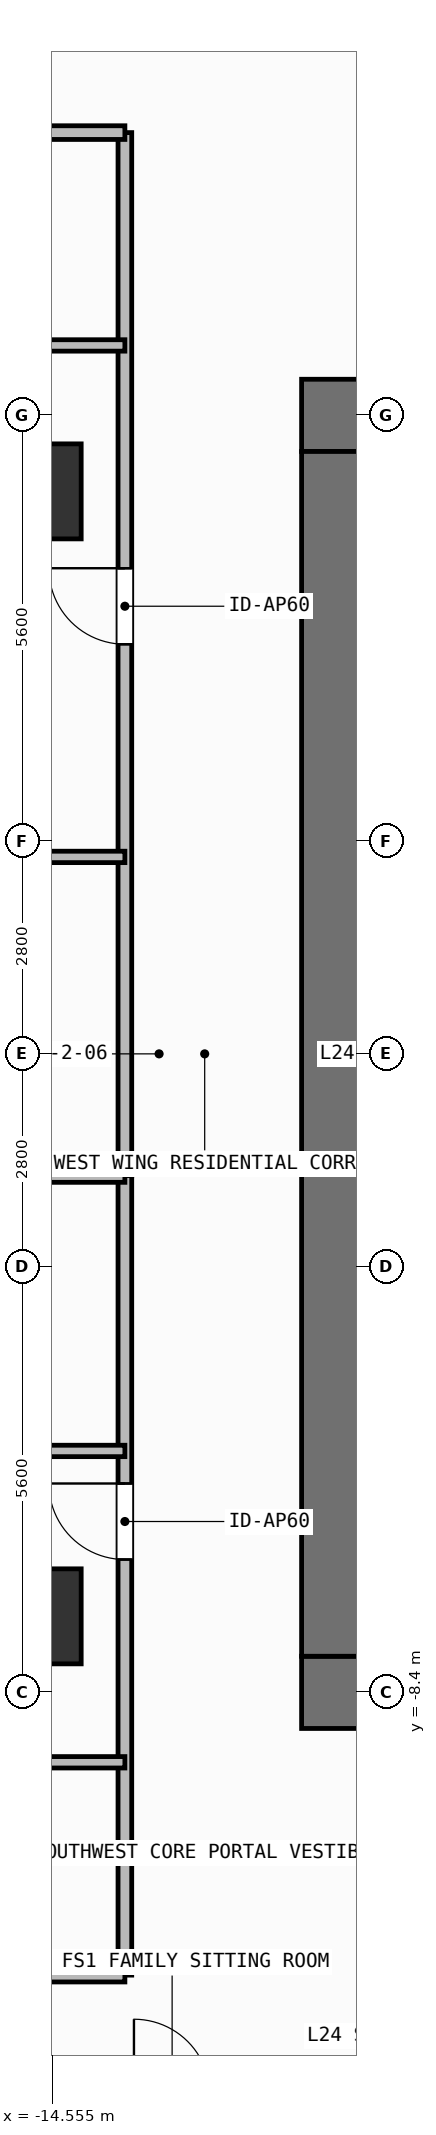
"""IFC4 building model, lengths in metres.
Left out: names, types, materials, properties, quantities, classifications, styles, units other than length and angle.
Written with IfcOpenShell. Run it as: python <this file> out.ifc"""

import sys

from ifc_helpers import new_model, si_unit, direction, frame, frame_2d, origin, origin_2d, place, context, subcontext, project, spatial, rectangle, extrude, element, fill, save


model = new_model("IFC4")
c1 = context("Model", 3, precision=1e-05, world=origin(), true_north=direction((0.0, 1.0)))
c2 = subcontext(c1, "Body", "Model", "MODEL_VIEW")
j1 = project(units=[si_unit("LENGTHUNIT", "METRE"), si_unit("PLANEANGLEUNIT", "RADIAN")], contexts=[c1])
p1 = place(None, origin())
s1 = spatial("IfcSite", under=j1, at=p1, CompositionType="ELEMENT")
p2 = place(p1, origin())
s2 = spatial("IfcBuilding", under=s1, at=p2, CompositionType="ELEMENT")
p3 = place(p2, frame((0.0, 0.0, 96.9)))
s3 = spatial("IfcBuildingStorey", under=s2, at=p3, CompositionType="ELEMENT", Elevation=96.9)
for number, where, z_axis, x_axis in (
    (1, (-11.275, -8.4, 0.0), (0.0, 0.0, 1.0), (1.0, 0.0, 0.0)),
    (2, (-11.275, 8.4, 0.0), (0.0, 0.0, 1.0), (1.0, 0.0, 0.0)),
):
    element("IfcWall", number, at=place(p3, frame(where, z_axis=z_axis, x_axis=x_axis)), inside=s3, PredefinedType="SHEAR", context=c2, shape_type="SweptSolid", body=[
        extrude(rectangle(XDim=1.575, YDim=0.95, at=frame_2d((0.788, 0.0))), origin(), (0.0, 0.0, 1.0), 3.9),
    ])
p4 = place(p3, frame((-10.8, -7.925, 0.0), z_axis=(0.0, 0.0, 1.0), x_axis=(0.0, 1.0, 0.0)))
e3 = element("IfcWall", 3, at=p4, inside=s3, PredefinedType="SHEAR", context=c2, shape_type="SweptSolid", body=[
    extrude(rectangle(XDim=15.85, YDim=0.95, at=frame_2d((7.925, 0.0))), origin(), (0.0, 0.0, 1.0), 3.9),
])
for number, where, z_axis, x_axis in (
    (4, (-14.8, -7.4, 0.0), (0.0, 0.0, 1.0), (1.0, 0.0, 0.0)),
    (5, (-14.8, 7.4, 0.0), (0.0, 0.0, 1.0), (1.0, 0.0, 0.0)),
):
    element("IfcColumn", number, at=place(p3, frame(where, z_axis=z_axis, x_axis=x_axis)), inside=s3, PredefinedType="COLUMN", context=c2, shape_type="SweptSolid", body=[
        extrude(rectangle(XDim=1.25, YDim=1.25, at=origin_2d()), origin(), (0.0, 0.0, 1.0), 3.9),
    ])
p5 = place(p3, frame((-13.6, -12.12, 0.0), z_axis=(0.0, 0.0, 1.0), x_axis=(0.0, 1.0, 0.0)))
e6 = element("IfcWall", 6, at=p5, inside=s3, PredefinedType="PARTITIONING", context=c2, shape_type="SweptSolid", body=[
    extrude(rectangle(XDim=10.52, YDim=0.18, at=frame_2d((5.26, 0.0))), origin(), (0.0, 0.0, 1.0), 3.68),
])
p6 = place(p5, frame((5.468, 0.0, 0.0)))
e7 = element("IfcOpeningElement", 7, at=p6, cuts=e6, PredefinedType="OPENING", context=c2, shape_type="SweptSolid", body=[
    extrude(rectangle(XDim=1.0, YDim=2.2, at=frame_2d((0.5, 1.1))), frame((0.0, 0.1, 0.0), z_axis=(0.0, -1.0, 0.0), x_axis=(1.0, 0.0, 0.0)), (0.0, 0.0, 1.0), 0.2),
])
p7 = place(p3, frame((-19.553, -5.224, 0.0), z_axis=(0.0, 0.0, 1.0), x_axis=(1.0, 0.0, 0.0)))
e8 = element("IfcWall", 8, at=p7, inside=s3, PredefinedType="PARTITIONING", context=c2, shape_type="SweptSolid", body=[
    extrude(rectangle(XDim=5.953, YDim=0.15, at=frame_2d((2.977, 0.0))), origin(), (0.0, 0.0, 1.0), 3.68),
])
p8 = place(p7, frame((2.64, 0.0, 0.0)))
e9 = element("IfcOpeningElement", 9, at=p8, cuts=e8, PredefinedType="OPENING", context=c2, shape_type="SweptSolid", body=[
    extrude(rectangle(XDim=0.85, YDim=2.1, at=frame_2d((0.425, 1.05))), frame((0.0, 0.085, 0.0), z_axis=(0.0, -1.0, 0.0), x_axis=(1.0, 0.0, 0.0)), (0.0, 0.0, 1.0), 0.17),
])
p9 = place(p3, frame((-23.69, -9.32, 0.0), z_axis=(0.0, 0.0, 1.0), x_axis=(1.0, 0.0, 0.0)))
e10 = element("IfcWall", 10, at=p9, inside=s3, PredefinedType="PARTITIONING", context=c2, shape_type="SweptSolid", body=[
    extrude(rectangle(XDim=10.09, YDim=0.15, at=frame_2d((5.045, 0.0))), origin(), (0.0, 0.0, 1.0), 3.68),
])
p10 = place(p9, frame((5.512, 0.0, 0.0)))
e11 = element("IfcOpeningElement", 11, at=p10, cuts=e10, PredefinedType="OPENING", context=c2, shape_type="SweptSolid", body=[
    extrude(rectangle(XDim=0.85, YDim=2.1, at=frame_2d((0.425, 1.05))), frame((0.0, 0.085, 0.0), z_axis=(0.0, -1.0, 0.0), x_axis=(1.0, 0.0, 0.0)), (0.0, 0.0, 1.0), 0.17),
])
p11 = place(p3, frame((-13.6, -1.6, 0.0), z_axis=(0.0, 0.0, 1.0), x_axis=(0.0, 1.0, 0.0)))
e12 = element("IfcWall", 12, at=p11, inside=s3, PredefinedType="PARTITIONING", context=c2, shape_type="SweptSolid", body=[
    extrude(rectangle(XDim=13.72, YDim=0.18, at=frame_2d((6.86, 0.0))), origin(), (0.0, 0.0, 1.0), 3.68),
])
p12 = place(p11, frame((6.989, 0.0, 0.0)))
e13 = element("IfcOpeningElement", 13, at=p12, cuts=e12, PredefinedType="OPENING", context=c2, shape_type="SweptSolid", body=[
    extrude(rectangle(XDim=1.0, YDim=2.2, at=frame_2d((0.5, 1.1))), frame((0.0, 0.1, 0.0), z_axis=(0.0, -1.0, 0.0), x_axis=(1.0, 0.0, 0.0)), (0.0, 0.0, 1.0), 0.2),
])
p13 = place(p3, frame((-19.553, 9.32, 0.0), z_axis=(0.0, 0.0, 1.0), x_axis=(1.0, 0.0, 0.0)))
e14 = element("IfcWall", 14, at=p13, inside=s3, PredefinedType="PARTITIONING", context=c2, shape_type="SweptSolid", body=[
    extrude(rectangle(XDim=5.953, YDim=0.15, at=frame_2d((2.977, 0.0))), origin(), (0.0, 0.0, 1.0), 3.68),
])
p14 = place(p13, frame((2.64, 0.0, 0.0)))
e15 = element("IfcOpeningElement", 15, at=p14, cuts=e14, PredefinedType="OPENING", context=c2, shape_type="SweptSolid", body=[
    extrude(rectangle(XDim=0.85, YDim=2.1, at=frame_2d((0.425, 1.05))), frame((0.0, 0.085, 0.0), z_axis=(0.0, -1.0, 0.0), x_axis=(1.0, 0.0, 0.0)), (0.0, 0.0, 1.0), 0.17),
])
p15 = place(p3, frame((-23.69, 2.591, 0.0), z_axis=(0.0, 0.0, 1.0), x_axis=(1.0, 0.0, 0.0)))
e16 = element("IfcWall", 16, at=p15, inside=s3, PredefinedType="PARTITIONING", context=c2, shape_type="SweptSolid", body=[
    extrude(rectangle(XDim=10.09, YDim=0.15, at=frame_2d((5.045, 0.0))), origin(), (0.0, 0.0, 1.0), 3.68),
])
p16 = place(p15, frame((4.62, 0.0, 0.0)))
e17 = element("IfcOpeningElement", 17, at=p16, cuts=e16, PredefinedType="OPENING", context=c2, shape_type="SweptSolid", body=[
    extrude(rectangle(XDim=0.85, YDim=2.1, at=frame_2d((0.425, 1.05))), frame((0.0, 0.085, 0.0), z_axis=(0.0, -1.0, 0.0), x_axis=(1.0, 0.0, 0.0)), (0.0, 0.0, 1.0), 0.17),
])
for number, where, z_axis, x_axis in (
    (18, (-27.93, -1.6, 0.0), (0.0, 0.0, 1.0), (1.0, 0.0, 0.0)),
    (19, (-27.93, -12.12, 0.0), (0.0, 0.0, 1.0), (1.0, 0.0, 0.0)),
    (20, (-27.93, 12.12, 0.0), (0.0, 0.0, 1.0), (1.0, 0.0, 0.0)),
):
    element("IfcWall", number, at=place(p3, frame(where, z_axis=z_axis, x_axis=x_axis)), inside=s3, PredefinedType="PARTITIONING", context=c2, shape_type="SweptSolid", body=[
        extrude(rectangle(XDim=14.33, YDim=0.18, at=frame_2d((7.165, 0.0))), origin(), (0.0, 0.0, 1.0), 3.68),
    ])
p17 = place(p6, origin())
e21 = element("IfcDoor", 21, at=p17, inside=s3, OperationType="SINGLE_SWING_RIGHT", PredefinedType="DOOR", context=c2, shape_type="SweptSolid", body=[
    extrude(rectangle(XDim=1.0, YDim=2.2, at=frame_2d((0.5, 1.1))), frame((0.0, 0.025, 0.0), z_axis=(0.0, -1.0, 0.0), x_axis=(1.0, 0.0, 0.0)), (0.0, 0.0, 1.0), 0.05),
])
fill(e7, e21)
p18 = place(p12, origin())
e22 = element("IfcDoor", 22, at=p18, inside=s3, OperationType="SINGLE_SWING_RIGHT", PredefinedType="DOOR", context=c2, shape_type="SweptSolid", body=[
    extrude(rectangle(XDim=1.0, YDim=2.2, at=frame_2d((0.5, 1.1))), frame((0.0, 0.025, 0.0), z_axis=(0.0, -1.0, 0.0), x_axis=(1.0, 0.0, 0.0)), (0.0, 0.0, 1.0), 0.05),
])
fill(e13, e22)
save(model, sys.argv[1])
